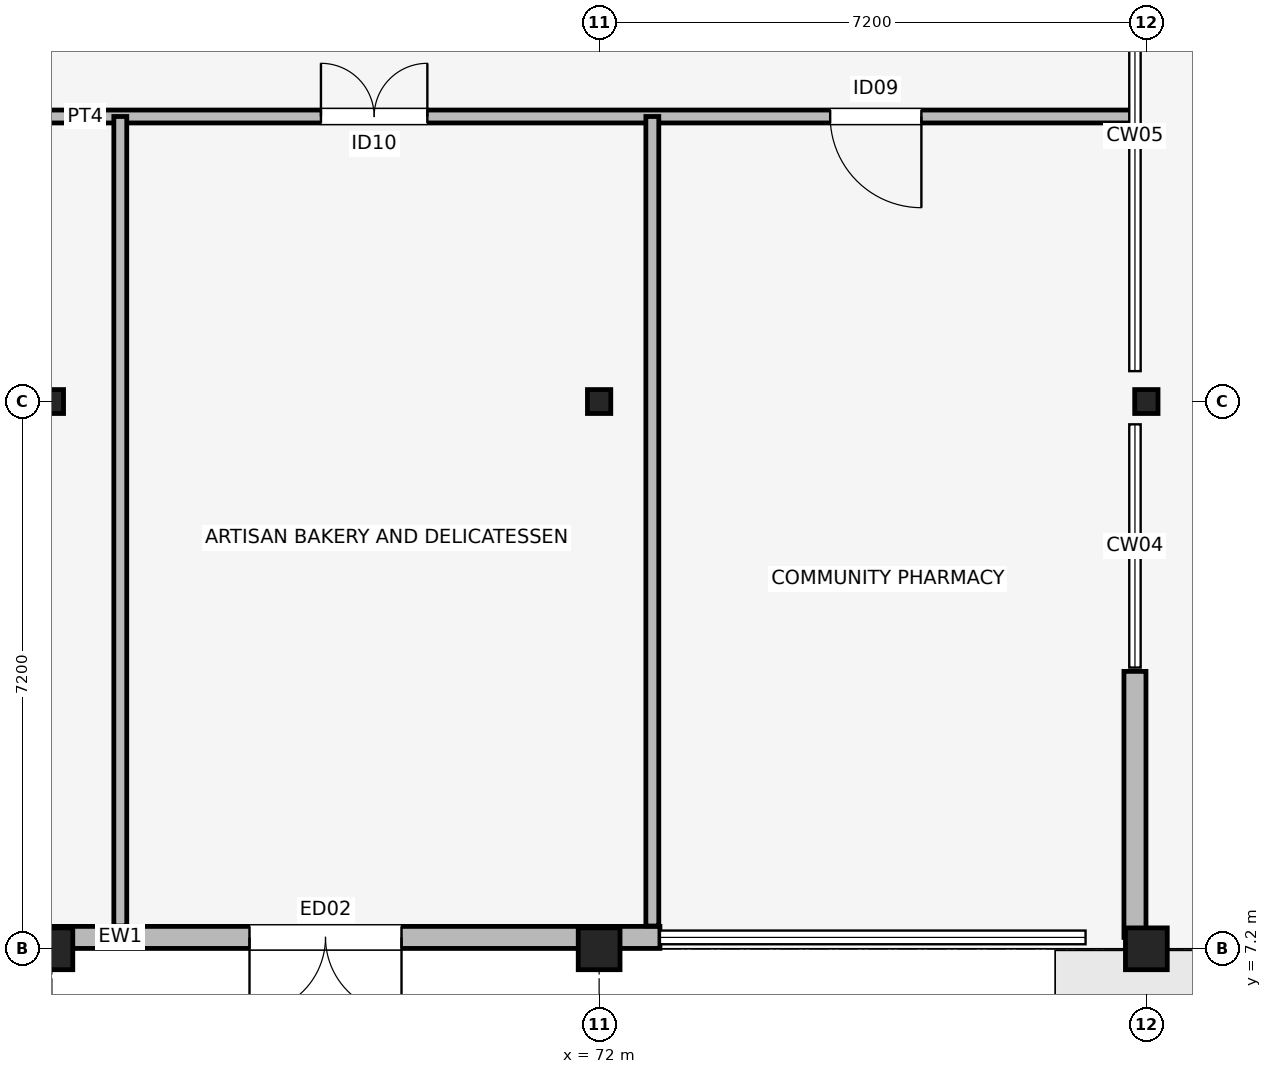
"""IFC4 building model, lengths in metres.
Left out: names, types, materials, properties, quantities, classifications, styles, units other than length and angle.
Written with IfcOpenShell. Run it as: python <this file> out.ifc"""

import sys

from ifc_helpers import new_model, si_unit, direction, frame, frame_2d, origin, origin_2d, place, context, subcontext, project, spatial, rectangle, circle, i_section, extrude, element, fill, save


model = new_model("IFC4")
c1 = context("Model", 3, precision=1e-05, world=origin(), true_north=direction((0.0, 1.0)))
c2 = subcontext(c1, "Body", "Model", "MODEL_VIEW")
j1 = project(units=[si_unit("LENGTHUNIT", "METRE"), si_unit("PLANEANGLEUNIT", "RADIAN")], contexts=[c1])
p1 = place(None, origin())
s1 = spatial("IfcSite", under=j1, at=p1, CompositionType="ELEMENT")
p2 = place(p1, origin())
s2 = spatial("IfcBuilding", under=s1, at=p2, CompositionType="ELEMENT")
p3 = place(p2, origin())
s3 = spatial("IfcBuildingStorey", under=s2, at=p3, CompositionType="ELEMENT", Elevation=0.0)
p4 = place(p3, frame((64.8, 7.2, 0.0), z_axis=(0.0, 0.0, 1.0), x_axis=(1.0, 0.0, 0.0)))
e1 = element("IfcColumn", 1, at=p4, inside=s3, PredefinedType="COLUMN", context=c2, shape_type="SweptSolid", body=[
    extrude(circle(Radius=0.275, at=origin_2d()), origin(), (0.0, 0.0, 1.0), 4.5),
])
p5 = place(p3, frame((64.8, 14.4, 0.0), z_axis=(0.0, 0.0, 1.0), x_axis=(1.0, 0.0, 0.0)))
e2 = element("IfcColumn", 2, at=p5, inside=s3, PredefinedType="COLUMN", context=c2, shape_type="SweptSolid", body=[
    extrude(i_section(OverallWidth=0.307, OverallDepth=0.315, WebThickness=0.012, FlangeThickness=0.019, FilletRadius=0.017, at=origin_2d()), origin(), (0.0, 0.0, 1.0), 4.5),
])
p6 = place(p3, frame((72.0, 7.2, 0.0), z_axis=(0.0, 0.0, 1.0), x_axis=(1.0, 0.0, 0.0)))
e3 = element("IfcColumn", 3, at=p6, inside=s3, PredefinedType="COLUMN", context=c2, shape_type="SweptSolid", body=[
    extrude(circle(Radius=0.275, at=origin_2d()), origin(), (0.0, 0.0, 1.0), 4.5),
])
p7 = place(p3, frame((72.0, 14.4, 0.0), z_axis=(0.0, 0.0, 1.0), x_axis=(1.0, 0.0, 0.0)))
e4 = element("IfcColumn", 4, at=p7, inside=s3, PredefinedType="COLUMN", context=c2, shape_type="SweptSolid", body=[
    extrude(i_section(OverallWidth=0.307, OverallDepth=0.315, WebThickness=0.012, FlangeThickness=0.019, FilletRadius=0.017, at=origin_2d()), origin(), (0.0, 0.0, 1.0), 4.5),
])
p8 = place(p3, frame((79.2, 7.2, 0.0), z_axis=(0.0, 0.0, 1.0), x_axis=(1.0, 0.0, 0.0)))
e5 = element("IfcColumn", 5, at=p8, inside=s3, PredefinedType="COLUMN", context=c2, shape_type="SweptSolid", body=[
    extrude(circle(Radius=0.275, at=origin_2d()), origin(), (0.0, 0.0, 1.0), 4.5),
])
p9 = place(p3, frame((79.2, 14.4, 0.0), z_axis=(0.0, 0.0, 1.0), x_axis=(1.0, 0.0, 0.0)))
e6 = element("IfcColumn", 6, at=p9, inside=s3, PredefinedType="COLUMN", context=c2, shape_type="SweptSolid", body=[
    extrude(i_section(OverallWidth=0.307, OverallDepth=0.315, WebThickness=0.012, FlangeThickness=0.019, FilletRadius=0.017, at=origin_2d()), origin(), (0.0, 0.0, 1.0), 4.5),
])
p10 = place(p3, frame((64.0, 7.35, 0.0), z_axis=(0.0, 0.0, 1.0), x_axis=(1.0, 0.0, 0.0)))
e7 = element("IfcWall", 7, at=p10, inside=s3, PredefinedType="SOLIDWALL", context=c2, shape_type="SweptSolid", body=[
    extrude(rectangle(XDim=8.8, YDim=0.29, at=frame_2d((4.4, 0.0))), origin(), (0.0, 0.0, 1.0), 2.752),
])
p11 = place(p10, frame((5.4, 0.0, 0.0), z_axis=(0.0, 0.0, 1.0), x_axis=(-1.0, 0.0, 0.0)))
e8 = element("IfcOpeningElement", 8, at=p11, cuts=e7, PredefinedType="OPENING", context=c2, shape_type="SweptSolid", body=[
    extrude(rectangle(XDim=2.0, YDim=2.5, at=frame_2d((1.0, 1.25))), frame((0.0, 0.155, 0.0), z_axis=(0.0, -1.0, 0.0), x_axis=(1.0, 0.0, 0.0)), (0.0, 0.0, 1.0), 0.31),
])
p12 = place(p3, frame((79.05, 7.35, 0.0), z_axis=(0.0, 0.0, 1.0), x_axis=(0.0, 1.0, 0.0)))
e9 = element("IfcWall", 9, at=p12, inside=s3, PredefinedType="SOLIDWALL", context=c2, shape_type="SweptSolid", body=[
    extrude(rectangle(XDim=3.5, YDim=0.29, at=frame_2d((1.75, 0.0))), origin(), (0.0, 0.0, 1.0), 3.775),
])
p13 = place(p3, frame((57.74, 18.15, 0.0), z_axis=(0.0, 0.0, 1.0), x_axis=(1.0, 0.0, 0.0)))
e10 = element("IfcWall", 10, at=p13, inside=s3, PredefinedType="PARTITIONING", context=c2, shape_type="SweptSolid", body=[
    extrude(rectangle(XDim=21.32, YDim=0.17, at=frame_2d((10.66, 0.0))), origin(), (0.0, 0.0, 1.0), 3.5),
])
p14 = place(p13, frame((3.0, 0.0, 0.0)))
e11 = element("IfcOpeningElement", 11, at=p14, cuts=e10, PredefinedType="OPENING", context=c2, shape_type="SweptSolid", body=[
    extrude(rectangle(XDim=1.4, YDim=2.22, at=frame_2d((0.7, 1.11))), frame((0.0, 0.095, 0.0), z_axis=(0.0, -1.0, 0.0), x_axis=(1.0, 0.0, 0.0)), (0.0, 0.0, 1.0), 0.19),
])
p15 = place(p13, frame((10.6, 0.0, 0.0)))
e12 = element("IfcOpeningElement", 12, at=p15, cuts=e10, PredefinedType="OPENING", context=c2, shape_type="SweptSolid", body=[
    extrude(rectangle(XDim=1.4, YDim=2.22, at=frame_2d((0.7, 1.11))), frame((0.0, 0.095, 0.0), z_axis=(0.0, -1.0, 0.0), x_axis=(1.0, 0.0, 0.0)), (0.0, 0.0, 1.0), 0.19),
])
p16 = place(p13, frame((18.5, 0.0, 0.0), z_axis=(0.0, 0.0, 1.0), x_axis=(-1.0, 0.0, 0.0)))
e13 = element("IfcOpeningElement", 13, at=p16, cuts=e10, PredefinedType="OPENING", context=c2, shape_type="SweptSolid", body=[
    extrude(rectangle(XDim=1.2, YDim=2.18, at=frame_2d((0.6, 1.09))), frame((0.0, 0.095, 0.0), z_axis=(0.0, -1.0, 0.0), x_axis=(1.0, 0.0, 0.0)), (0.0, 0.0, 1.0), 0.19),
])
for number, where, z_axis, x_axis in (
    (14, (65.7, 7.5, 0.0), (0.0, 0.0, 1.0), (0.0, 1.0, 0.0)),
    (15, (72.7, 7.5, 0.0), (0.0, 0.0, 1.0), (0.0, 1.0, 0.0)),
):
    element("IfcWall", number, at=place(p3, frame(where, z_axis=z_axis, x_axis=x_axis)), inside=s3, PredefinedType="PARTITIONING", context=c2, shape_type="SweptSolid", body=[
        extrude(rectangle(XDim=10.65, YDim=0.17, at=frame_2d((5.325, 0.0))), origin(), (0.0, 0.0, 1.0), 3.5),
    ])
p17 = place(p11, origin())
e16 = element("IfcDoor", 16, at=p17, inside=s3, OperationType="DOUBLE_DOOR_SINGLE_SWING", PredefinedType="DOOR", context=c2, shape_type="SweptSolid", body=[
    extrude(rectangle(XDim=2.0, YDim=2.5, at=frame_2d((1.0, 1.25))), frame((0.0, 0.025, 0.0), z_axis=(0.0, -1.0, 0.0), x_axis=(1.0, 0.0, 0.0)), (0.0, 0.0, 1.0), 0.05),
])
fill(e8, e16)
p18 = place(p15, origin())
e17 = element("IfcDoor", 17, at=p18, inside=s3, OperationType="DOUBLE_DOOR_SINGLE_SWING", PredefinedType="DOOR", context=c2, shape_type="SweptSolid", body=[
    extrude(rectangle(XDim=1.4, YDim=2.22, at=frame_2d((0.7, 1.11))), frame((0.0, 0.025, 0.0), z_axis=(0.0, -1.0, 0.0), x_axis=(1.0, 0.0, 0.0)), (0.0, 0.0, 1.0), 0.05),
])
fill(e12, e17)
p19 = place(p16, origin())
e18 = element("IfcDoor", 18, at=p19, inside=s3, OperationType="SINGLE_SWING_RIGHT", PredefinedType="DOOR", context=c2, shape_type="SweptSolid", body=[
    extrude(rectangle(XDim=1.2, YDim=2.18, at=frame_2d((0.6, 1.09))), frame((0.0, 0.025, 0.0), z_axis=(0.0, -1.0, 0.0), x_axis=(1.0, 0.0, 0.0)), (0.0, 0.0, 1.0), 0.05),
])
fill(e13, e18)
save(model, sys.argv[1])
